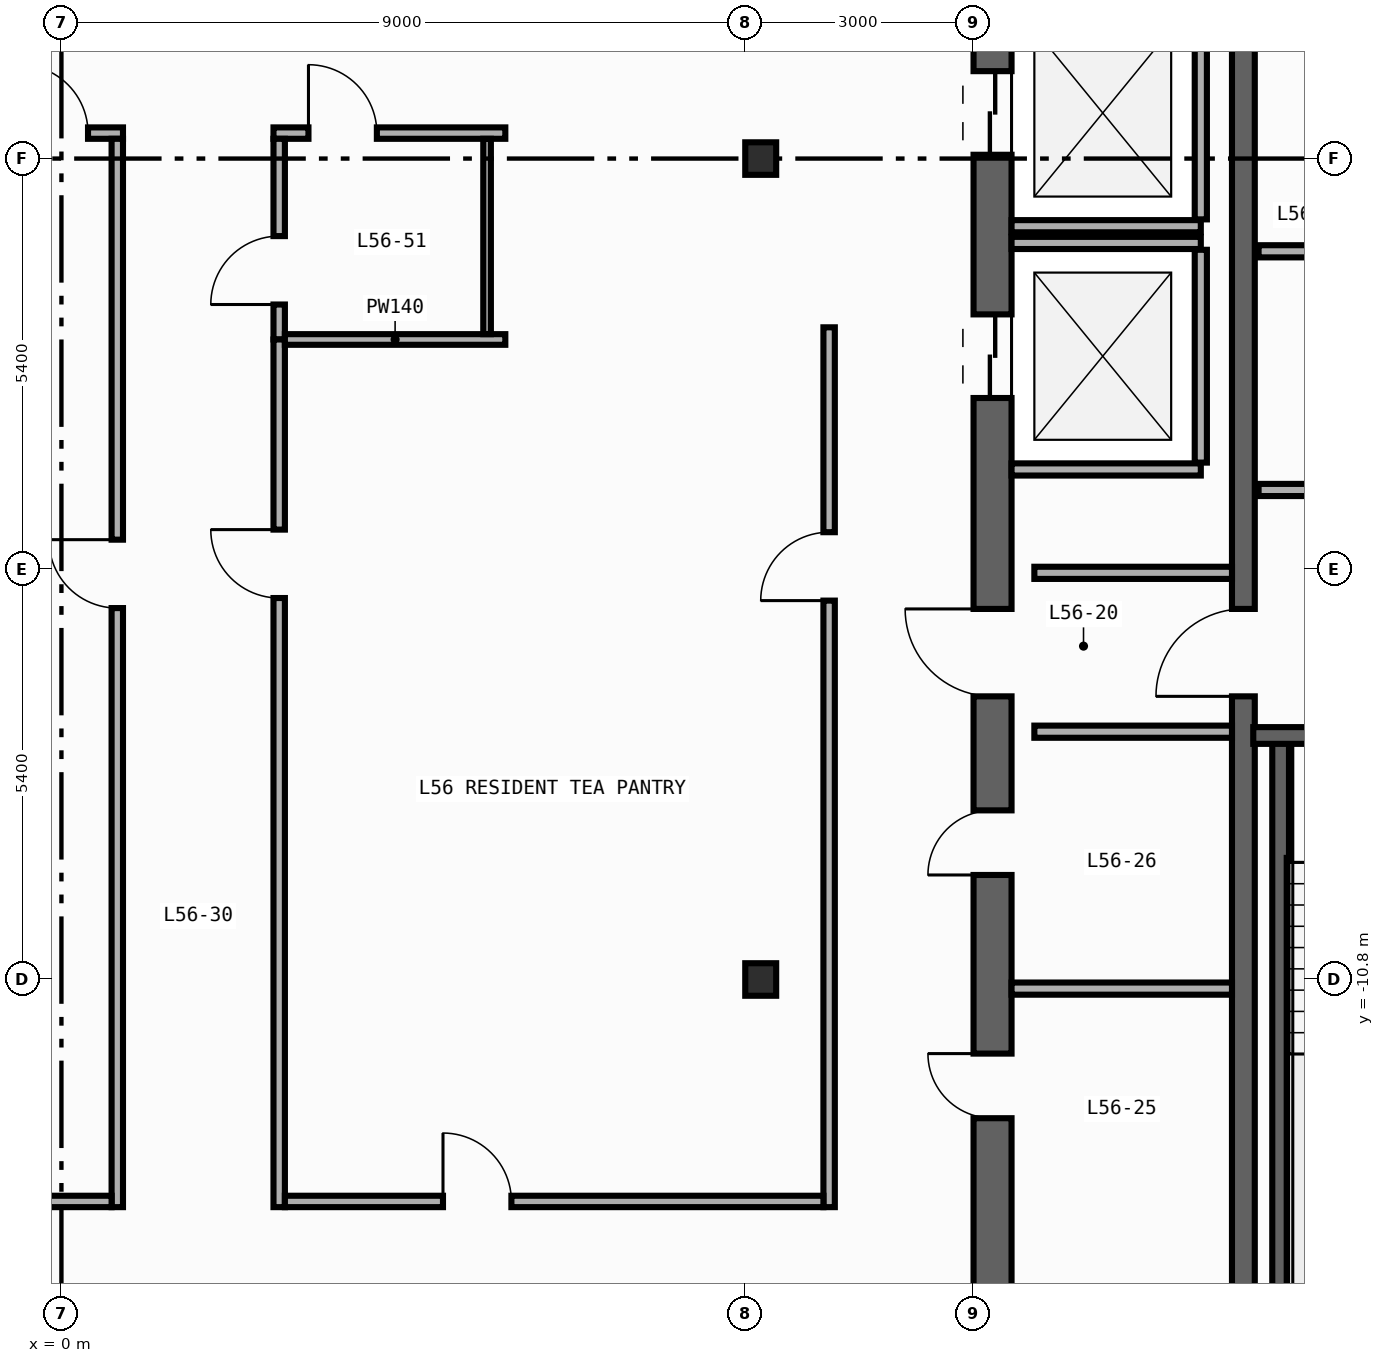
"""IFC4 building model, lengths in metres.
Left out: names, types, materials, properties, quantities, classifications, styles, units other than length and angle.
Written with IfcOpenShell. Run it as: python <this file> out.ifc"""

import sys

from ifc_helpers import new_model, si_unit, direction, frame, frame_2d, origin, origin_2d, place, context, subcontext, project, spatial, rectangle, i_section, extrude, element, fill, save


model = new_model("IFC4")
c1 = context("Model", 3, precision=1e-05, world=origin(), true_north=direction((0.0, 1.0)))
c2 = subcontext(c1, "Body", "Model", "MODEL_VIEW")
j1 = project(units=[si_unit("LENGTHUNIT", "METRE"), si_unit("PLANEANGLEUNIT", "RADIAN")], contexts=[c1])
p1 = place(None, origin())
s1 = spatial("IfcSite", under=j1, at=p1, CompositionType="ELEMENT")
p2 = place(p1, origin())
s2 = spatial("IfcBuilding", under=s1, at=p2, CompositionType="ELEMENT")
p3 = place(p2, frame((0.0, 0.0, 240.4)))
s3 = spatial("IfcBuildingStorey", under=s2, at=p3, CompositionType="ELEMENT", Elevation=240.4)
p4 = place(p3, frame((12.25, -19.8, 0.0), z_axis=(0.0, 0.0, 1.0), x_axis=(0.0, 1.0, 0.0)))
e1 = element("IfcWall", 1, at=p4, inside=s3, PredefinedType="SHEAR", context=c2, shape_type="SweptSolid", body=[
    extrude(rectangle(XDim=27.0, YDim=0.5, at=frame_2d((13.5, 0.0))), origin(), (0.0, 0.0, 1.0), 3.34),
])
p5 = place(p4, frame((23.05, 0.0, 0.0)))
e2 = element("IfcOpeningElement", 2, at=p5, cuts=e1, PredefinedType="OPENING", context=c2, shape_type="SweptSolid", body=[
    extrude(rectangle(XDim=1.1, YDim=2.2, at=frame_2d((0.55, 1.1))), frame((0.0, 0.26, 0.0), z_axis=(0.0, -1.0, 0.0), x_axis=(1.0, 0.0, 0.0)), (0.0, 0.0, 1.0), 0.52),
])
p6 = place(p4, frame((19.85, 0.0, 0.0)))
e3 = element("IfcOpeningElement", 3, at=p6, cuts=e1, PredefinedType="OPENING", context=c2, shape_type="SweptSolid", body=[
    extrude(rectangle(XDim=1.1, YDim=2.2, at=frame_2d((0.55, 1.1))), frame((0.0, 0.26, 0.0), z_axis=(0.0, -1.0, 0.0), x_axis=(1.0, 0.0, 0.0)), (0.0, 0.0, 1.0), 0.52),
])
p7 = place(p4, frame((16.65, 0.0, 0.0)))
e4 = element("IfcOpeningElement", 4, at=p7, cuts=e1, PredefinedType="OPENING", context=c2, shape_type="SweptSolid", body=[
    extrude(rectangle(XDim=1.1, YDim=2.2, at=frame_2d((0.55, 1.1))), frame((0.0, 0.26, 0.0), z_axis=(0.0, -1.0, 0.0), x_axis=(1.0, 0.0, 0.0)), (0.0, 0.0, 1.0), 0.52),
])
p8 = place(p4, frame((7.175, 0.0, 0.0)))
e5 = element("IfcOpeningElement", 5, at=p8, cuts=e1, PredefinedType="OPENING", context=c2, shape_type="SweptSolid", body=[
    extrude(rectangle(XDim=0.85, YDim=2.1, at=frame_2d((0.425, 1.05))), frame((0.0, 0.26, 0.0), z_axis=(0.0, -1.0, 0.0), x_axis=(1.0, 0.0, 0.0)), (0.0, 0.0, 1.0), 0.52),
])
p9 = place(p4, frame((10.375, 0.0, 0.0)))
e6 = element("IfcOpeningElement", 6, at=p9, cuts=e1, PredefinedType="OPENING", context=c2, shape_type="SweptSolid", body=[
    extrude(rectangle(XDim=0.85, YDim=2.1, at=frame_2d((0.425, 1.05))), frame((0.0, 0.26, 0.0), z_axis=(0.0, -1.0, 0.0), x_axis=(1.0, 0.0, 0.0)), (0.0, 0.0, 1.0), 0.52),
])
p10 = place(p4, frame((12.725, 0.0, 0.0)))
e7 = element("IfcOpeningElement", 7, at=p10, cuts=e1, PredefinedType="OPENING", context=c2, shape_type="SweptSolid", body=[
    extrude(rectangle(XDim=1.15, YDim=2.2, at=frame_2d((0.575, 1.1))), frame((0.0, 0.26, 0.0), z_axis=(0.0, -1.0, 0.0), x_axis=(1.0, 0.0, 0.0)), (0.0, 0.0, 1.0), 0.52),
])
p11 = place(p4, frame((25.125, 0.0, 0.0)))
e8 = element("IfcOpeningElement", 8, at=p11, cuts=e1, PredefinedType="OPENING", context=c2, shape_type="SweptSolid", body=[
    extrude(rectangle(XDim=0.85, YDim=2.1, at=frame_2d((0.425, 1.05))), frame((0.0, 0.26, 0.0), z_axis=(0.0, -1.0, 0.0), x_axis=(1.0, 0.0, 0.0)), (0.0, 0.0, 1.0), 0.52),
])
p12 = place(p3, frame((15.55, -19.3, 0.0), z_axis=(0.0, 0.0, 1.0), x_axis=(0.0, 1.0, 0.0)))
e9 = element("IfcWall", 9, at=p12, inside=s3, PredefinedType="SHEAR", context=c2, shape_type="SweptSolid", body=[
    extrude(rectangle(XDim=26.0, YDim=0.3, at=frame_2d((13.0, 0.0))), origin(), (0.0, 0.0, 1.0), 3.34),
])
p13 = place(p12, frame((12.225, 0.0, 0.0)))
e10 = element("IfcOpeningElement", 10, at=p13, cuts=e9, PredefinedType="OPENING", context=c2, shape_type="SweptSolid", body=[
    extrude(rectangle(XDim=1.15, YDim=2.2, at=frame_2d((0.575, 1.1))), frame((0.0, 0.16, 0.0), z_axis=(0.0, -1.0, 0.0), x_axis=(1.0, 0.0, 0.0)), (0.0, 0.0, 1.0), 0.32),
])
p14 = place(p12, frame((24.625, 0.0, 0.0)))
e11 = element("IfcOpeningElement", 11, at=p14, cuts=e9, PredefinedType="OPENING", context=c2, shape_type="SweptSolid", body=[
    extrude(rectangle(XDim=0.85, YDim=2.1, at=frame_2d((0.425, 1.05))), frame((0.0, 0.16, 0.0), z_axis=(0.0, -1.0, 0.0), x_axis=(1.0, 0.0, 0.0)), (0.0, 0.0, 1.0), 0.32),
])
p15 = place(p3, frame((16.04, -19.01, 0.0), z_axis=(0.0, 0.0, 1.0), x_axis=(0.0, 1.0, 0.0)))
e12 = element("IfcWall", 12, at=p15, inside=s3, PredefinedType="SHEAR", context=c2, shape_type="SweptSolid", body=[
    extrude(rectangle(XDim=11.42, YDim=0.22, at=frame_2d((5.71, 0.0))), origin(), (0.0, 0.0, 1.0), 3.34),
])
p16 = place(p3, frame((19.92, -7.59, 0.0), z_axis=(0.0, 0.0, 1.0), x_axis=(-1.0, 0.0, 0.0)))
e13 = element("IfcWall", 13, at=p16, inside=s3, PredefinedType="SHEAR", context=c2, shape_type="SweptSolid", body=[
    extrude(rectangle(XDim=4.24, YDim=0.22, at=frame_2d((2.12, 0.0))), origin(), (0.0, 0.0, 1.0), 3.34),
])
p17 = place(p16, frame((1.08, 0.0, 0.0)))
e14 = element("IfcOpeningElement", 14, at=p17, cuts=e13, PredefinedType="OPENING", context=c2, shape_type="SweptSolid", body=[
    extrude(rectangle(XDim=1.1, YDim=2.2, at=frame_2d((0.55, 1.1))), frame((0.0, 0.12, 0.0), z_axis=(0.0, -1.0, 0.0), x_axis=(1.0, 0.0, 0.0)), (0.0, 0.0, 1.0), 0.24),
])
for number, where, z_axis, x_axis in (
    (15, (9.2, -10.8, 0.0), (0.0, 0.0, 1.0), (1.0, 0.0, 0.0)),
    (16, (9.2, 0.0, 0.0), (0.0, 0.0, 1.0), (1.0, 0.0, 0.0)),
):
    element("IfcColumn", number, at=place(p3, frame(where, z_axis=z_axis, x_axis=x_axis)), inside=s3, PredefinedType="COLUMN", context=c2, shape_type="SweptSolid", body=[
        extrude(i_section(OverallWidth=0.407, OverallDepth=0.428, WebThickness=0.02, FlangeThickness=0.035, FilletRadius=0.022, at=origin_2d()), origin(), (0.0, 0.0, 1.0), 3.6),
    ])
p18 = place(p3, frame((12.5, -0.89, 0.0), z_axis=(0.0, 0.0, 1.0), x_axis=(1.0, 0.0, 0.0)))
e17 = element("IfcWall", 17, at=p18, inside=s3, PredefinedType="STANDARD", context=c2, shape_type="SweptSolid", body=[
    extrude(rectangle(XDim=2.49, YDim=0.16, at=frame_2d((1.245, 0.0))), origin(), (0.0, 0.0, 1.0), 3.34),
])
p19 = place(p3, frame((14.99, -0.8, 0.0), z_axis=(0.0, 0.0, 1.0), x_axis=(0.0, 1.0, 0.0)))
e18 = element("IfcWall", 18, at=p19, inside=s3, PredefinedType="STANDARD", context=c2, shape_type="SweptSolid", body=[
    extrude(rectangle(XDim=2.8, YDim=0.16, at=frame_2d((1.4, 0.0))), origin(), (0.0, 0.0, 1.0), 3.34),
])
for number, where, z_axis, x_axis in (
    (19, (12.5, -4.09, 0.0), (0.0, 0.0, 1.0), (1.0, 0.0, 0.0)),
    (20, (12.5, -1.11, 0.0), (0.0, 0.0, 1.0), (1.0, 0.0, 0.0)),
):
    element("IfcWall", number, at=place(p3, frame(where, z_axis=z_axis, x_axis=x_axis)), inside=s3, PredefinedType="STANDARD", context=c2, shape_type="SweptSolid", body=[
        extrude(rectangle(XDim=2.49, YDim=0.16, at=frame_2d((1.245, 0.0))), origin(), (0.0, 0.0, 1.0), 3.34),
    ])
p20 = place(p3, frame((14.99, -4.0, 0.0), z_axis=(0.0, 0.0, 1.0), x_axis=(0.0, 1.0, 0.0)))
e21 = element("IfcWall", 21, at=p20, inside=s3, PredefinedType="STANDARD", context=c2, shape_type="SweptSolid", body=[
    extrude(rectangle(XDim=2.8, YDim=0.16, at=frame_2d((1.4, 0.0))), origin(), (0.0, 0.0, 1.0), 3.34),
])
p21 = place(p3, frame((15.75, -4.36, 0.0), z_axis=(0.0, 0.0, 1.0), x_axis=(1.0, 0.0, 0.0)))
e22 = element("IfcWall", 22, at=p21, inside=s3, PredefinedType="STANDARD", context=c2, shape_type="SweptSolid", body=[
    extrude(rectangle(XDim=3.8, YDim=0.16, at=frame_2d((1.9, 0.0))), origin(), (0.0, 0.0, 1.0), 3.34),
])
p22 = place(p21, frame((1.47, 0.0, 0.0)))
e23 = element("IfcOpeningElement", 23, at=p22, cuts=e22, PredefinedType="OPENING", context=c2, shape_type="SweptSolid", body=[
    extrude(rectangle(XDim=1.15, YDim=2.2, at=frame_2d((0.575, 1.1))), frame((0.0, 0.09, 0.0), z_axis=(0.0, -1.0, 0.0), x_axis=(1.0, 0.0, 0.0)), (0.0, 0.0, 1.0), 0.18),
])
p23 = place(p3, frame((15.75, -1.22, 0.0), z_axis=(0.0, 0.0, 1.0), x_axis=(1.0, 0.0, 0.0)))
e24 = element("IfcWall", 24, at=p23, inside=s3, PredefinedType="STANDARD", context=c2, shape_type="SweptSolid", body=[
    extrude(rectangle(XDim=3.8, YDim=0.16, at=frame_2d((1.9, 0.0))), origin(), (0.0, 0.0, 1.0), 3.34),
])
for number, where, z_axis, x_axis in (
    (25, (12.8, -5.45, 0.0), (0.0, 0.0, 1.0), (1.0, 0.0, 0.0)),
    (26, (12.8, -7.54, 0.0), (0.0, 0.0, 1.0), (1.0, 0.0, 0.0)),
):
    element("IfcWall", number, at=place(p3, frame(where, z_axis=z_axis, x_axis=x_axis)), inside=s3, PredefinedType="STANDARD", context=c2, shape_type="SweptSolid", body=[
        extrude(rectangle(XDim=2.6, YDim=0.16, at=frame_2d((1.3, 0.0))), origin(), (0.0, 0.0, 1.0), 3.34),
    ])
p24 = place(p3, frame((12.5, -10.92, 0.0), z_axis=(0.0, 0.0, 1.0), x_axis=(1.0, 0.0, 0.0)))
e27 = element("IfcWall", 27, at=p24, inside=s3, PredefinedType="PARTITIONING", context=c2, shape_type="SweptSolid", body=[
    extrude(rectangle(XDim=2.9, YDim=0.16, at=frame_2d((1.45, 0.0))), origin(), (0.0, 0.0, 1.0), 2.44),
])
p25 = place(p3, frame((10.1, -13.795, 0.0), z_axis=(0.0, 0.0, 1.0), x_axis=(0.0, 1.0, 0.0)))
e28 = element("IfcWall", 28, at=p25, inside=s3, PredefinedType="PARTITIONING", context=c2, shape_type="SweptSolid", body=[
    extrude(rectangle(XDim=11.575, YDim=0.15, at=frame_2d((5.788, 0.0))), origin(), (0.0, 0.0, 1.0), 3.34),
])
p26 = place(p25, frame((7.979, 0.0, 0.0)))
e29 = element("IfcOpeningElement", 29, at=p26, cuts=e28, PredefinedType="OPENING", context=c2, shape_type="SweptSolid", body=[
    extrude(rectangle(XDim=0.9, YDim=2.15, at=frame_2d((0.45, 1.075))), frame((0.0, 0.085, 0.0), z_axis=(0.0, -1.0, 0.0), x_axis=(1.0, 0.0, 0.0)), (0.0, 0.0, 1.0), 0.17),
])
p27 = place(p3, frame((-10.025, 0.335, 0.0), z_axis=(0.0, 0.0, 1.0), x_axis=(1.0, 0.0, 0.0)))
e30 = element("IfcWall", 30, at=p27, inside=s3, PredefinedType="PARTITIONING", context=c2, shape_type="SweptSolid", body=[
    extrude(rectangle(XDim=10.835, YDim=0.15, at=frame_2d((5.417, 0.0))), origin(), (0.0, 0.0, 1.0), 2.44),
])
p28 = place(p27, frame((9.475, 0.0, 0.0)))
e31 = element("IfcOpeningElement", 31, at=p28, cuts=e30, PredefinedType="OPENING", context=c2, shape_type="SweptSolid", body=[
    extrude(rectangle(XDim=0.9, YDim=2.15, at=frame_2d((0.45, 1.075))), frame((0.0, 0.085, 0.0), z_axis=(0.0, -1.0, 0.0), x_axis=(1.0, 0.0, 0.0)), (0.0, 0.0, 1.0), 0.17),
])
p29 = place(p3, frame((2.79, 0.335, 0.0), z_axis=(0.0, 0.0, 1.0), x_axis=(1.0, 0.0, 0.0)))
e32 = element("IfcWall", 32, at=p29, inside=s3, PredefinedType="PARTITIONING", context=c2, shape_type="SweptSolid", body=[
    extrude(rectangle(XDim=3.05, YDim=0.15, at=frame_2d((1.525, 0.0))), origin(), (0.0, 0.0, 1.0), 2.44),
])
p30 = place(p29, frame((0.46, 0.0, 0.0)))
e33 = element("IfcOpeningElement", 33, at=p30, cuts=e32, PredefinedType="OPENING", context=c2, shape_type="SweptSolid", body=[
    extrude(rectangle(XDim=0.9, YDim=2.15, at=frame_2d((0.45, 1.075))), frame((0.0, 0.085, 0.0), z_axis=(0.0, -1.0, 0.0), x_axis=(1.0, 0.0, 0.0)), (0.0, 0.0, 1.0), 0.17),
])
p31 = place(p3, frame((0.735, -13.795, 0.0), z_axis=(0.0, 0.0, 1.0), x_axis=(0.0, 1.0, 0.0)))
e34 = element("IfcWall", 34, at=p31, inside=s3, PredefinedType="PARTITIONING", context=c2, shape_type="SweptSolid", body=[
    extrude(rectangle(XDim=14.055, YDim=0.15, at=frame_2d((7.027, 0.0))), origin(), (0.0, 0.0, 1.0), 3.34),
])
p32 = place(p31, frame((7.881, 0.0, 0.0)))
e35 = element("IfcOpeningElement", 35, at=p32, cuts=e34, PredefinedType="OPENING", context=c2, shape_type="SweptSolid", body=[
    extrude(rectangle(XDim=0.9, YDim=2.15, at=frame_2d((0.45, 1.075))), frame((0.0, 0.085, 0.0), z_axis=(0.0, -1.0, 0.0), x_axis=(1.0, 0.0, 0.0)), (0.0, 0.0, 1.0), 0.17),
])
p33 = place(p3, frame((2.865, -2.38, 0.0), z_axis=(0.0, 0.0, 1.0), x_axis=(0.0, 1.0, 0.0)))
e36 = element("IfcWall", 36, at=p33, inside=s3, PredefinedType="PARTITIONING", context=c2, shape_type="SweptSolid", body=[
    extrude(rectangle(XDim=2.64, YDim=0.15, at=frame_2d((1.32, 0.0))), origin(), (0.0, 0.0, 1.0), 3.34),
])
p34 = place(p33, frame((0.46, 0.0, 0.0)))
e37 = element("IfcOpeningElement", 37, at=p34, cuts=e36, PredefinedType="OPENING", context=c2, shape_type="SweptSolid", body=[
    extrude(rectangle(XDim=0.9, YDim=2.15, at=frame_2d((0.45, 1.075))), frame((0.0, 0.085, 0.0), z_axis=(0.0, -1.0, 0.0), x_axis=(1.0, 0.0, 0.0)), (0.0, 0.0, 1.0), 0.17),
])
p35 = place(p3, frame((2.865, -13.795, 0.0), z_axis=(0.0, 0.0, 1.0), x_axis=(0.0, 1.0, 0.0)))
e38 = element("IfcWall", 38, at=p35, inside=s3, PredefinedType="PARTITIONING", context=c2, shape_type="SweptSolid", body=[
    extrude(rectangle(XDim=11.415, YDim=0.15, at=frame_2d((5.708, 0.0))), origin(), (0.0, 0.0, 1.0), 3.34),
])
p36 = place(p35, frame((8.013, 0.0, 0.0)))
e39 = element("IfcOpeningElement", 39, at=p36, cuts=e38, PredefinedType="OPENING", context=c2, shape_type="SweptSolid", body=[
    extrude(rectangle(XDim=0.9, YDim=2.15, at=frame_2d((0.45, 1.075))), frame((0.0, 0.085, 0.0), z_axis=(0.0, -1.0, 0.0), x_axis=(1.0, 0.0, 0.0)), (0.0, 0.0, 1.0), 0.17),
])
p37 = place(p3, frame((-10.025, -13.72, 0.0), z_axis=(0.0, 0.0, 1.0), x_axis=(1.0, 0.0, 0.0)))
e40 = element("IfcWall", 40, at=p37, inside=s3, PredefinedType="PARTITIONING", context=c2, shape_type="SweptSolid", body=[
    extrude(rectangle(XDim=10.685, YDim=0.15, at=frame_2d((5.342, 0.0))), origin(), (0.0, 0.0, 1.0), 3.34),
])
p38 = place(p37, frame((7.31, 0.0, 0.0)))
e41 = element("IfcOpeningElement", 41, at=p38, cuts=e40, PredefinedType="OPENING", context=c2, shape_type="SweptSolid", body=[
    extrude(rectangle(XDim=0.9, YDim=2.15, at=frame_2d((0.45, 1.075))), frame((0.0, 0.085, 0.0), z_axis=(0.0, -1.0, 0.0), x_axis=(1.0, 0.0, 0.0)), (0.0, 0.0, 1.0), 0.17),
])
p39 = place(p3, frame((2.94, -13.72, 0.0), z_axis=(0.0, 0.0, 1.0), x_axis=(1.0, 0.0, 0.0)))
e42 = element("IfcWall", 42, at=p39, inside=s3, PredefinedType="PARTITIONING", context=c2, shape_type="SweptSolid", body=[
    extrude(rectangle(XDim=7.085, YDim=0.15, at=frame_2d((3.542, 0.0))), origin(), (0.0, 0.0, 1.0), 3.34),
])
p40 = place(p39, frame((2.08, 0.0, 0.0)))
e43 = element("IfcOpeningElement", 43, at=p40, cuts=e42, PredefinedType="OPENING", context=c2, shape_type="SweptSolid", body=[
    extrude(rectangle(XDim=0.9, YDim=2.15, at=frame_2d((0.45, 1.075))), frame((0.0, 0.085, 0.0), z_axis=(0.0, -1.0, 0.0), x_axis=(1.0, 0.0, 0.0)), (0.0, 0.0, 1.0), 0.17),
])
p41 = place(p3, frame((2.94, -2.38, 0.0), z_axis=(0.0, 0.0, 1.0), x_axis=(1.0, 0.0, 0.0)))
e44 = element("IfcWall", 44, at=p41, inside=s3, PredefinedType="PARTITIONING", context=c2, shape_type="SweptSolid", body=[
    extrude(rectangle(XDim=2.9, YDim=0.14, at=frame_2d((1.45, 0.0))), origin(), (0.0, 0.0, 1.0), 3.34),
])
p42 = place(p3, frame((5.6, 0.26, 0.0), z_axis=(0.0, 0.0, 1.0), x_axis=(0.0, -1.0, 0.0)))
e45 = element("IfcWall", 45, at=p42, inside=s3, PredefinedType="PARTITIONING", context=c2, shape_type="SweptSolid", body=[
    extrude(rectangle(XDim=2.57, YDim=0.1, at=frame_2d((1.285, 0.0))), origin(), (0.0, 0.0, 1.0), 3.34),
])
p43 = place(p6, origin())
e46 = element("IfcDoor", 46, at=p43, inside=s3, OperationType="DOUBLE_DOOR_SLIDING", PredefinedType="DOOR", context=c2, shape_type="SweptSolid", body=[
    extrude(rectangle(XDim=1.1, YDim=2.2, at=frame_2d((0.55, 1.1))), frame((0.0, 0.025, 0.0), z_axis=(0.0, -1.0, 0.0), x_axis=(1.0, 0.0, 0.0)), (0.0, 0.0, 1.0), 0.05),
])
fill(e3, e46)
p44 = place(p7, origin())
e47 = element("IfcDoor", 47, at=p44, inside=s3, OperationType="DOUBLE_DOOR_SLIDING", PredefinedType="DOOR", context=c2, shape_type="SweptSolid", body=[
    extrude(rectangle(XDim=1.1, YDim=2.2, at=frame_2d((0.55, 1.1))), frame((0.0, 0.025, 0.0), z_axis=(0.0, -1.0, 0.0), x_axis=(1.0, 0.0, 0.0)), (0.0, 0.0, 1.0), 0.05),
])
fill(e4, e47)
p45 = place(p8, origin())
e48 = element("IfcDoor", 48, at=p45, inside=s3, OperationType="SINGLE_SWING_RIGHT", PredefinedType="DOOR", context=c2, shape_type="SweptSolid", body=[
    extrude(rectangle(XDim=0.85, YDim=2.1, at=frame_2d((0.425, 1.05))), frame((0.0, 0.025, 0.0), z_axis=(0.0, -1.0, 0.0), x_axis=(1.0, 0.0, 0.0)), (0.0, 0.0, 1.0), 0.05),
])
fill(e5, e48)
p46 = place(p9, origin())
e49 = element("IfcDoor", 49, at=p46, inside=s3, OperationType="SINGLE_SWING_LEFT", PredefinedType="DOOR", context=c2, shape_type="SweptSolid", body=[
    extrude(rectangle(XDim=0.85, YDim=2.1, at=frame_2d((0.425, 1.05))), frame((0.0, 0.025, 0.0), z_axis=(0.0, -1.0, 0.0), x_axis=(1.0, 0.0, 0.0)), (0.0, 0.0, 1.0), 0.05),
])
fill(e6, e49)
p47 = place(p10, origin())
e50 = element("IfcDoor", 50, at=p47, inside=s3, OperationType="SINGLE_SWING_RIGHT", PredefinedType="DOOR", context=c2, shape_type="SweptSolid", body=[
    extrude(rectangle(XDim=1.15, YDim=2.2, at=frame_2d((0.575, 1.1))), frame((0.0, 0.025, 0.0), z_axis=(0.0, -1.0, 0.0), x_axis=(1.0, 0.0, 0.0)), (0.0, 0.0, 1.0), 0.05),
])
fill(e7, e50)
p48 = place(p13, origin())
e51 = element("IfcDoor", 51, at=p48, inside=s3, OperationType="SINGLE_SWING_LEFT", PredefinedType="DOOR", context=c2, shape_type="SweptSolid", body=[
    extrude(rectangle(XDim=1.15, YDim=2.2, at=frame_2d((0.575, 1.1))), frame((0.0, 0.025, 0.0), z_axis=(0.0, -1.0, 0.0), x_axis=(1.0, 0.0, 0.0)), (0.0, 0.0, 1.0), 0.05),
])
fill(e10, e51)
p49 = place(p26, origin())
e52 = element("IfcDoor", 52, at=p49, inside=s3, OperationType="SINGLE_SWING_LEFT", PredefinedType="DOOR", context=c2, shape_type="SweptSolid", body=[
    extrude(rectangle(XDim=0.9, YDim=2.15, at=frame_2d((0.45, 1.075))), frame((0.0, 0.025, 0.0), z_axis=(0.0, -1.0, 0.0), x_axis=(1.0, 0.0, 0.0)), (0.0, 0.0, 1.0), 0.05),
])
fill(e29, e52)
p50 = place(p28, origin())
e53 = element("IfcDoor", 53, at=p50, inside=s3, OperationType="SINGLE_SWING_LEFT", PredefinedType="DOOR", context=c2, shape_type="SweptSolid", body=[
    extrude(rectangle(XDim=0.9, YDim=2.15, at=frame_2d((0.45, 1.075))), frame((0.0, 0.025, 0.0), z_axis=(0.0, -1.0, 0.0), x_axis=(1.0, 0.0, 0.0)), (0.0, 0.0, 1.0), 0.05),
])
fill(e31, e53)
p51 = place(p30, origin())
e54 = element("IfcDoor", 54, at=p51, inside=s3, OperationType="SINGLE_SWING_LEFT", PredefinedType="DOOR", context=c2, shape_type="SweptSolid", body=[
    extrude(rectangle(XDim=0.9, YDim=2.15, at=frame_2d((0.45, 1.075))), frame((0.0, 0.025, 0.0), z_axis=(0.0, -1.0, 0.0), x_axis=(1.0, 0.0, 0.0)), (0.0, 0.0, 1.0), 0.05),
])
fill(e33, e54)
p52 = place(p32, origin())
e55 = element("IfcDoor", 55, at=p52, inside=s3, OperationType="SINGLE_SWING_RIGHT", PredefinedType="DOOR", context=c2, shape_type="SweptSolid", body=[
    extrude(rectangle(XDim=0.9, YDim=2.15, at=frame_2d((0.45, 1.075))), frame((0.0, 0.025, 0.0), z_axis=(0.0, -1.0, 0.0), x_axis=(1.0, 0.0, 0.0)), (0.0, 0.0, 1.0), 0.05),
])
fill(e35, e55)
p53 = place(p34, origin())
e56 = element("IfcDoor", 56, at=p53, inside=s3, OperationType="SINGLE_SWING_LEFT", PredefinedType="DOOR", context=c2, shape_type="SweptSolid", body=[
    extrude(rectangle(XDim=0.9, YDim=2.15, at=frame_2d((0.45, 1.075))), frame((0.0, 0.025, 0.0), z_axis=(0.0, -1.0, 0.0), x_axis=(1.0, 0.0, 0.0)), (0.0, 0.0, 1.0), 0.05),
])
fill(e37, e56)
p54 = place(p36, origin())
e57 = element("IfcDoor", 57, at=p54, inside=s3, OperationType="SINGLE_SWING_RIGHT", PredefinedType="DOOR", context=c2, shape_type="SweptSolid", body=[
    extrude(rectangle(XDim=0.9, YDim=2.15, at=frame_2d((0.45, 1.075))), frame((0.0, 0.025, 0.0), z_axis=(0.0, -1.0, 0.0), x_axis=(1.0, 0.0, 0.0)), (0.0, 0.0, 1.0), 0.05),
])
fill(e39, e57)
p55 = place(p40, origin())
e58 = element("IfcDoor", 58, at=p55, inside=s3, OperationType="SINGLE_SWING_LEFT", PredefinedType="DOOR", context=c2, shape_type="SweptSolid", body=[
    extrude(rectangle(XDim=0.9, YDim=2.15, at=frame_2d((0.45, 1.075))), frame((0.0, 0.025, 0.0), z_axis=(0.0, -1.0, 0.0), x_axis=(1.0, 0.0, 0.0)), (0.0, 0.0, 1.0), 0.05),
])
fill(e43, e58)
save(model, sys.argv[1])
